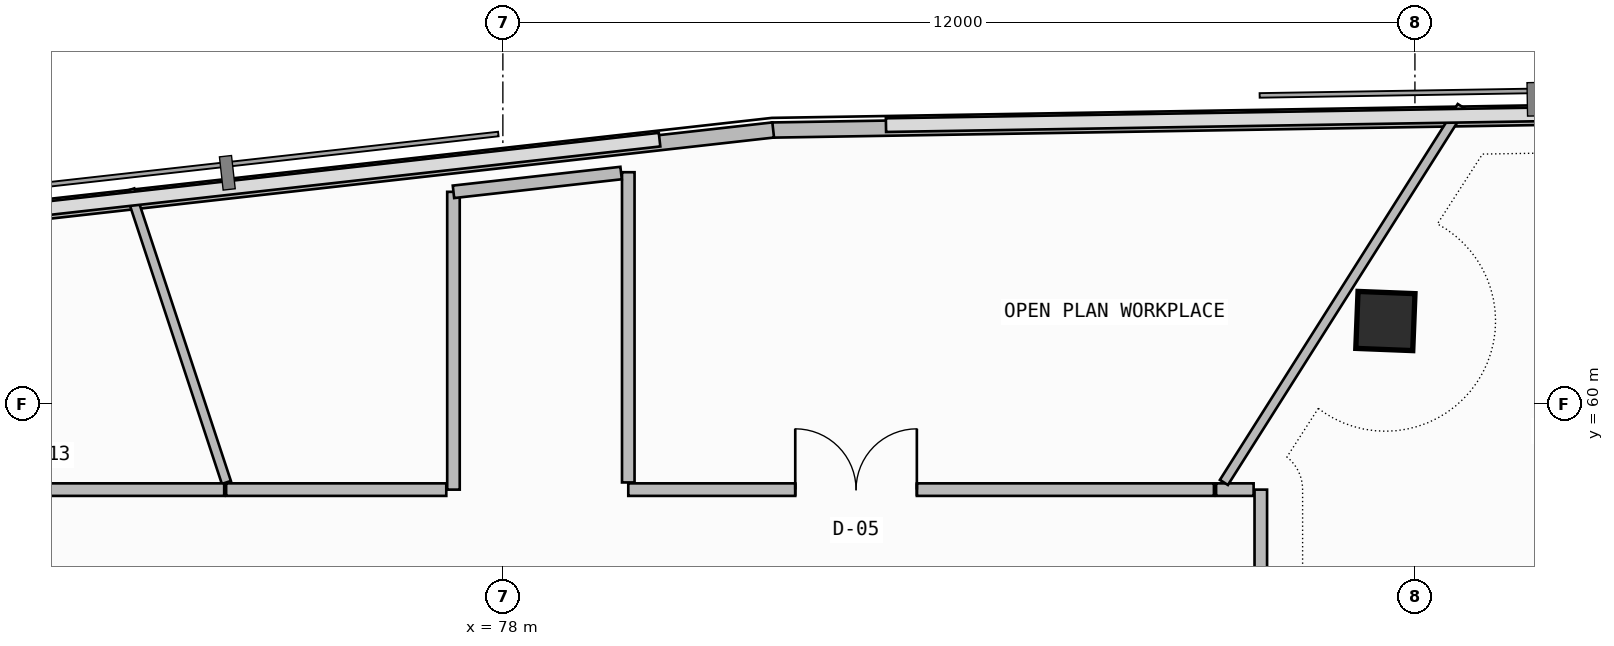
"""IFC4 building model, lengths in metres.
Left out: names, types, materials, properties, quantities, classifications, styles, units other than length and angle.
Written with IfcOpenShell. Run it as: python <this file> out.ifc"""

import sys

from ifc_helpers import new_model, si_unit, direction, frame, frame_2d, origin, origin_2d, place, context, subcontext, project, spatial, rectangle, extrude, element, fill, save


model = new_model("IFC4")
c1 = context("Model", 3, precision=1e-05, world=origin(), true_north=direction((0.0, 1.0)))
c2 = subcontext(c1, "Body", "Model", "MODEL_VIEW")
j1 = project(units=[si_unit("LENGTHUNIT", "METRE"), si_unit("PLANEANGLEUNIT", "RADIAN")], contexts=[c1])
p1 = place(None, origin())
s1 = spatial("IfcSite", under=j1, at=p1, CompositionType="ELEMENT")
p2 = place(p1, origin())
s2 = spatial("IfcBuilding", under=s1, at=p2, CompositionType="ELEMENT")
p3 = place(p2, frame((0.0, 0.0, 281.86)))
s3 = spatial("IfcBuildingStorey", under=s2, at=p3, CompositionType="ELEMENT", Elevation=281.86)
p4 = place(p3, frame((89.611, 61.09, 0.0), z_axis=(0.0, 0.0, 1.0), x_axis=(0.039259815759, 0.999229036241, 0.0)))
e1 = element("IfcColumn", 1, at=p4, inside=s3, PredefinedType="COLUMN", context=c2, shape_type="SweptSolid", body=[
    extrude(rectangle(XDim=0.75, YDim=0.75, at=origin_2d()), origin(), (0.0, 0.0, 1.0), 3.52),
])
p5 = place(p3, frame((111.271, 64.092, 0.0), z_axis=(0.0, 0.0, 1.0), x_axis=(-0.999864741935, -0.016446818413, 0.0)))
e2 = element("IfcWall", 2, at=p5, inside=s3, PredefinedType="PARAPET", context=c2, shape_type="SweptSolid", body=[
    extrude(rectangle(XDim=29.733, YDim=0.2, at=frame_2d((14.866, 0.0))), origin(), (0.0, 0.0, 1.0), 1.15),
])
p6 = place(p3, frame((81.557, 63.604, 0.0), z_axis=(0.0, 0.0, 1.0), x_axis=(-0.993776455024, -0.111392806945, 0.0)))
e3 = element("IfcWall", 3, at=p6, inside=s3, PredefinedType="PARAPET", context=c2, shape_type="SweptSolid", body=[
    extrude(rectangle(XDim=24.891, YDim=0.2, at=frame_2d((12.446, 0.0))), origin(), (0.0, 0.0, 1.0), 1.15),
])
p7 = place(p3, frame((108.868, 58.337, 0.0), z_axis=(0.0, 0.0, 1.0), x_axis=(-0.921966033449, -0.387270749174, 0.0)))
e4 = element("IfcWall", 4, at=p7, inside=s3, PredefinedType="PARTITIONING", context=c2, shape_type="SweptSolid", body=[
    extrude(rectangle(XDim=22.562, YDim=0.125, at=frame_2d((11.281, 0.0))), origin(), (0.0, 0.0, 1.0), 2.645),
])
p8 = place(p3, frame((88.021, 51.396, 0.0), z_axis=(0.0, 0.0, 1.0), x_axis=(0.842826341775, 0.538185616316, 0.0)))
e5 = element("IfcWall", 5, at=p8, inside=s3, PredefinedType="PARTITIONING", context=c2, shape_type="SweptSolid", body=[
    extrude(rectangle(XDim=23.791, YDim=0.125, at=frame_2d((11.895, 0.0))), origin(), (0.0, 0.0, 1.0), 2.645),
])
p9 = place(p3, frame((87.972, 51.424, 0.0), z_axis=(0.0, 0.0, 1.0), x_axis=(0.0, 1.0, 0.0)))
e6 = element("IfcWall", 6, at=p9, inside=s3, PredefinedType="PARTITIONING", context=c2, shape_type="SweptSolid", body=[
    extrude(rectangle(XDim=7.448, YDim=0.165, at=frame_2d((3.724, 0.0))), origin(), (0.0, 0.0, 1.0), 2.745),
])
p10 = place(p9, frame((2.317, 0.0, 0.0)))
e7 = element("IfcOpeningElement", 7, at=p10, cuts=e6, PredefinedType="OPENING", context=c2, shape_type="SweptSolid", body=[
    extrude(rectangle(XDim=1.0, YDim=2.2, at=frame_2d((0.5, 1.1))), frame((0.0, 0.093, 0.0), z_axis=(0.0, -1.0, 0.0), x_axis=(1.0, 0.0, 0.0)), (0.0, 0.0, 1.0), 0.185),
])
p11 = place(p3, frame((87.878, 58.872, 0.0), z_axis=(0.0, 0.0, 1.0), x_axis=(-1.0, 0.0, 0.0)))
e8 = element("IfcWall", 8, at=p11, inside=s3, PredefinedType="PARTITIONING", context=c2, shape_type="SweptSolid", body=[
    extrude(rectangle(XDim=0.494, YDim=0.165, at=frame_2d((0.247, 0.0))), origin(), (0.0, 0.0, 1.0), 2.745),
])
p12 = place(p3, frame((87.487, 58.967, 0.0), z_axis=(0.0, 0.0, 1.0), x_axis=(0.534730479589, 0.845022670819, 0.0)))
e9 = element("IfcWall", 9, at=p12, inside=s3, PredefinedType="PARTITIONING", context=c2, shape_type="SweptSolid", body=[
    extrude(rectangle(XDim=5.852, YDim=0.125, at=frame_2d((2.926, 0.0))), origin(), (0.0, 0.0, 1.0), 2.745),
])
p13 = place(p3, frame((87.355, 58.872, 0.0), z_axis=(0.0, 0.0, 1.0), x_axis=(-1.0, 0.0, 0.0)))
e10 = element("IfcWall", 10, at=p13, inside=s3, PredefinedType="PARTITIONING", context=c2, shape_type="SweptSolid", body=[
    extrude(rectangle(XDim=7.706, YDim=0.165, at=frame_2d((3.853, 0.0))), origin(), (0.0, 0.0, 1.0), 2.745),
])
p14 = place(p13, frame((3.909, 0.0, 0.0)))
e11 = element("IfcOpeningElement", 11, at=p14, cuts=e10, PredefinedType="OPENING", context=c2, shape_type="SweptSolid", body=[
    extrude(rectangle(XDim=1.6, YDim=2.3, at=frame_2d((0.8, 1.15))), frame((0.0, 0.093, 0.0), z_axis=(0.0, -1.0, 0.0), x_axis=(1.0, 0.0, 0.0)), (0.0, 0.0, 1.0), 0.185),
])
p15 = place(p3, frame((79.65, 58.967, 0.0), z_axis=(0.0, 0.0, 1.0), x_axis=(0.0, 1.0, 0.0)))
e12 = element("IfcWall", 12, at=p15, inside=s3, PredefinedType="PARTITIONING", context=c2, shape_type="SweptSolid", body=[
    extrude(rectangle(XDim=4.081, YDim=0.165, at=frame_2d((2.041, 0.0))), origin(), (0.0, 0.0, 1.0), 3.26),
])
p16 = place(p3, frame((77.35, 62.79, 0.0), z_axis=(0.0, 0.0, 1.0), x_axis=(0.0, -1.0, 0.0)))
e13 = element("IfcWall", 13, at=p16, inside=s3, PredefinedType="PARTITIONING", context=c2, shape_type="SweptSolid", body=[
    extrude(rectangle(XDim=3.918, YDim=0.165, at=frame_2d((1.959, 0.0))), origin(), (0.0, 0.0, 1.0), 3.26),
])
p17 = place(p3, frame((77.256, 58.872, 0.0), z_axis=(0.0, 0.0, 1.0), x_axis=(-1.0, 0.0, 0.0)))
e14 = element("IfcWall", 14, at=p17, inside=s3, PredefinedType="PARTITIONING", context=c2, shape_type="SweptSolid", body=[
    extrude(rectangle(XDim=2.897, YDim=0.165, at=frame_2d((1.448, 0.0))), origin(), (0.0, 0.0, 1.0), 3.26),
])
p18 = place(p3, frame((79.555, 63.037, 0.0), z_axis=(0.0, 0.0, 1.0), x_axis=(-0.993770518254, -0.11144575833, 0.0)))
e15 = element("IfcWall", 15, at=p18, inside=s3, PredefinedType="PARTITIONING", context=c2, shape_type="SweptSolid", body=[
    extrude(rectangle(XDim=2.219, YDim=0.165, at=frame_2d((1.11, 0.0))), origin(), (0.0, 0.0, 1.0), 3.26),
])
p19 = place(p3, frame((74.362, 58.967, 0.0), z_axis=(0.0, 0.0, 1.0), x_axis=(-0.313552340659, 0.949570918714, 0.0)))
e16 = element("IfcWall", 16, at=p19, inside=s3, PredefinedType="PARTITIONING", context=c2, shape_type="SweptSolid", body=[
    extrude(rectangle(XDim=4.053, YDim=0.125, at=frame_2d((2.027, 0.0))), origin(), (0.0, 0.0, 1.0), 3.26),
])
p20 = place(p3, frame((74.333, 58.872, 0.0), z_axis=(0.0, 0.0, 1.0), x_axis=(-1.0, 0.0, 0.0)))
e17 = element("IfcWall", 17, at=p20, inside=s3, PredefinedType="PARTITIONING", context=c2, shape_type="SweptSolid", body=[
    extrude(rectangle(XDim=4.661, YDim=0.165, at=frame_2d((2.331, 0.0))), origin(), (0.0, 0.0, 1.0), 3.26),
])
p21 = place(p14, frame((1.6, 0.0, 0.0), z_axis=(0.0, 0.0, 1.0), x_axis=(-1.0, 0.0, 0.0)))
e18 = element("IfcDoor", 18, at=p21, inside=s3, OperationType="DOUBLE_DOOR_SINGLE_SWING", PredefinedType="DOOR", context=c2, shape_type="SweptSolid", body=[
    extrude(rectangle(XDim=1.6, YDim=2.3, at=frame_2d((0.8, 1.15))), frame((0.0, 0.025, 0.0), z_axis=(0.0, -1.0, 0.0), x_axis=(1.0, 0.0, 0.0)), (0.0, 0.0, 1.0), 0.05),
])
fill(e11, e18)
save(model, sys.argv[1])
